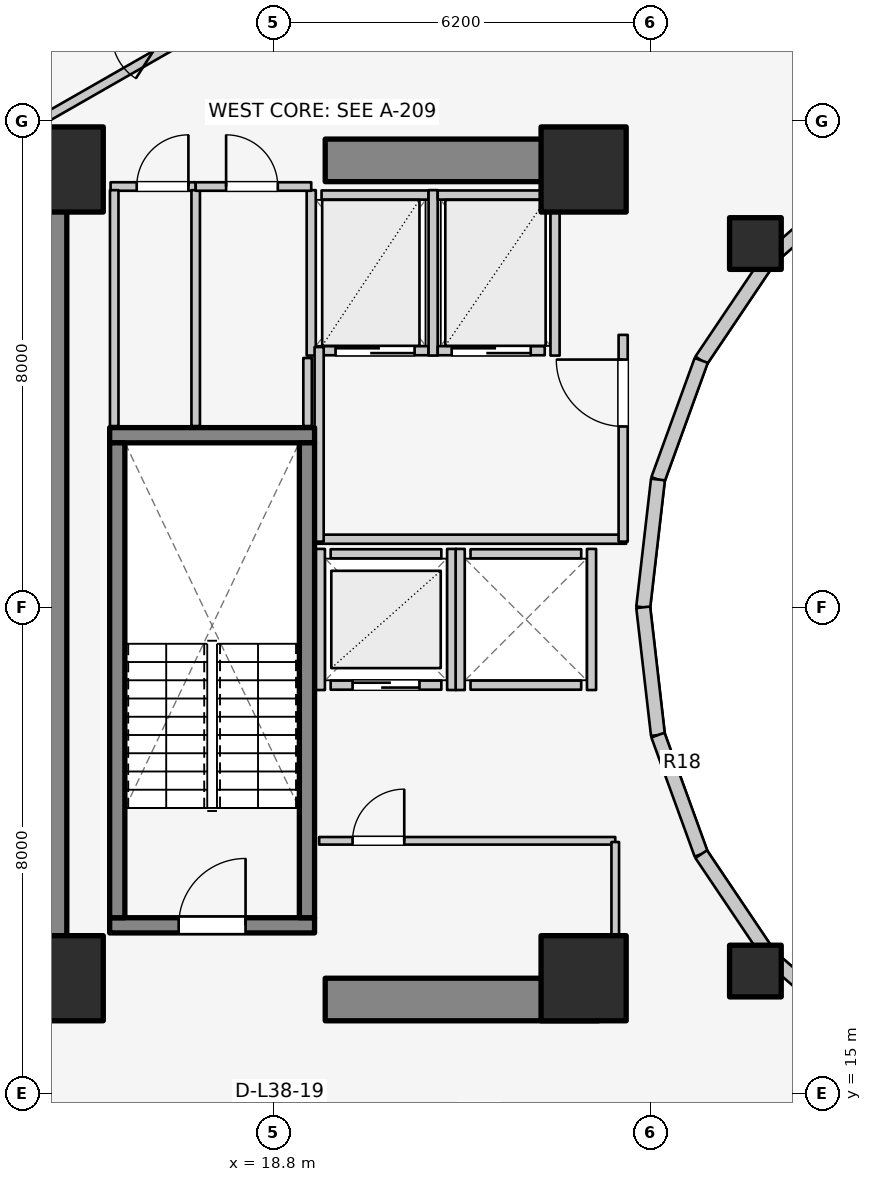
"""IFC4 building model, lengths in metres.
Left out: names, types, materials, properties, quantities, classifications, styles, units other than length and angle.
Written with IfcOpenShell. Run it as: python <this file> out.ifc"""

import sys

from ifc_helpers import new_model, si_unit, direction, frame, frame_2d, origin, origin_2d, place, context, subcontext, project, spatial, rectangle, extrude, element, fill, save


model = new_model("IFC4")
c1 = context("Model", 3, precision=1e-05, world=origin(), true_north=direction((0.0, 1.0)))
c2 = subcontext(c1, "Body", "Model", "MODEL_VIEW")
j1 = project(units=[si_unit("LENGTHUNIT", "METRE"), si_unit("PLANEANGLEUNIT", "RADIAN")], contexts=[c1])
p1 = place(None, origin())
s1 = spatial("IfcSite", under=j1, at=p1, CompositionType="ELEMENT")
p2 = place(p1, origin())
s2 = spatial("IfcBuilding", under=s1, at=p2, CompositionType="ELEMENT")
p3 = place(p2, frame((0.0, 0.0, 125.9)))
s3 = spatial("IfcBuildingStorey", under=s2, at=p3, CompositionType="ELEMENT", Elevation=125.9)
p4 = place(p3, frame((15.05, 17.05, 0.0), z_axis=(0.0, 0.0, 1.0), x_axis=(0.0, 1.0, 0.0)))
e1 = element("IfcWall", 1, at=p4, inside=s3, PredefinedType="SHEAR", context=c2, shape_type="SweptSolid", body=[
    extrude(rectangle(XDim=12.8, YDim=0.7, at=frame_2d((6.4, 0.0))), origin(), (0.0, 0.0, 1.0), 3.1),
])
for number, where, z_axis, x_axis in (
    (2, (19.65, 16.55, 0.0), (0.0, 0.0, 1.0), (1.0, 0.0, 0.0)),
    (3, (19.65, 30.35, 0.0), (0.0, 0.0, 1.0), (1.0, 0.0, 0.0)),
):
    element("IfcWall", number, at=place(p3, frame(where, z_axis=z_axis, x_axis=x_axis)), inside=s3, PredefinedType="SHEAR", context=c2, shape_type="SweptSolid", body=[
        extrude(rectangle(XDim=4.5, YDim=0.7, at=frame_2d((2.25, 0.0))), origin(), (0.0, 0.0, 1.0), 3.1),
    ])
p5 = place(p3, frame((16.105, 17.77, 0.0), z_axis=(0.0, 0.0, 1.0), x_axis=(1.0, 0.0, 0.0)))
e4 = element("IfcWall", 4, at=p5, inside=s3, PredefinedType="SOLIDWALL", context=c2, shape_type="SweptSolid", body=[
    extrude(rectangle(XDim=3.37, YDim=0.25, at=frame_2d((1.685, 0.0))), origin(), (0.0, 0.0, 1.0), 3.1),
])
p6 = place(p5, frame((1.135, 0.0, 0.0)))
e5 = element("IfcOpeningElement", 5, at=p6, cuts=e4, PredefinedType="OPENING", context=c2, shape_type="SweptSolid", body=[
    extrude(rectangle(XDim=1.1, YDim=2.1, at=frame_2d((0.55, 1.05))), frame((0.0, 0.135, 0.0), z_axis=(0.0, -1.0, 0.0), x_axis=(1.0, 0.0, 0.0)), (0.0, 0.0, 1.0), 0.27),
])
p7 = place(p3, frame((16.105, 25.83, 0.0), z_axis=(0.0, 0.0, 1.0), x_axis=(1.0, 0.0, 0.0)))
e6 = element("IfcWall", 6, at=p7, inside=s3, PredefinedType="SOLIDWALL", context=c2, shape_type="SweptSolid", body=[
    extrude(rectangle(XDim=3.37, YDim=0.25, at=frame_2d((1.685, 0.0))), origin(), (0.0, 0.0, 1.0), 3.1),
])
for number, where, z_axis, x_axis in (
    (7, (16.23, 17.895, 0.0), (0.0, 0.0, 1.0), (0.0, 1.0, 0.0)),
    (8, (19.35, 17.895, 0.0), (0.0, 0.0, 1.0), (0.0, 1.0, 0.0)),
):
    element("IfcWall", number, at=place(p3, frame(where, z_axis=z_axis, x_axis=x_axis)), inside=s3, PredefinedType="SOLIDWALL", context=c2, shape_type="SweptSolid", body=[
        extrude(rectangle(XDim=7.81, YDim=0.25, at=frame_2d((3.905, 0.0))), origin(), (0.0, 0.0, 1.0), 3.1),
    ])
for number, where, z_axis, x_axis in (
    (9, (15.3, 16.9, 0.0), (0.0, 0.0, 1.0), (1.0, 0.0, 0.0)),
    (10, (23.9, 16.9, 0.0), (0.0, 0.0, 1.0), (1.0, 0.0, 0.0)),
    (11, (23.9, 30.2, 0.0), (0.0, 0.0, 1.0), (1.0, 0.0, 0.0)),
    (12, (15.3, 30.2, 0.0), (0.0, 0.0, 1.0), (1.0, 0.0, 0.0)),
):
    element("IfcColumn", number, at=place(p3, frame(where, z_axis=z_axis, x_axis=x_axis)), inside=s3, PredefinedType="COLUMN", context=c2, shape_type="SweptSolid", body=[
        extrude(rectangle(XDim=1.4, YDim=1.4, at=origin_2d()), origin(), (0.0, 0.0, 1.0), 3.1),
    ])
for number, where, z_axis, x_axis in (
    (13, (26.725, 28.982, 0.0), (0.0, 0.0, 1.0), (1.0, 0.0, 0.0)),
    (14, (26.725, 17.018, 0.0), (0.0, 0.0, 1.0), (1.0, 0.0, 0.0)),
):
    element("IfcColumn", number, at=place(p3, frame(where, z_axis=z_axis, x_axis=x_axis)), inside=s3, PredefinedType="COLUMN", context=c2, shape_type="SweptSolid", body=[
        extrude(rectangle(XDim=0.85, YDim=0.85, at=origin_2d()), origin(), (0.0, 0.0, 1.0), 3.1),
    ])
p8 = place(p3, frame((28.44, 30.032, 0.0), z_axis=(0.0, 0.0, 1.0), x_axis=(-0.752576694707, -0.658504607869, 0.0)))
e15 = element("IfcWall", 15, at=p8, inside=s3, PredefinedType="STANDARD", context=c2, shape_type="SweptSolid", body=[
    extrude(rectangle(XDim=1.959, YDim=0.23, at=frame_2d((0.98, 0.0))), origin(), (0.0, 0.0, 1.0), 1.22),
])
p9 = place(p3, frame((26.965, 28.742, 0.0), z_axis=(0.0, 0.0, 1.0), x_axis=(-0.558197800898, -0.829707909492, 0.0)))
e16 = element("IfcWall", 16, at=p9, inside=s3, PredefinedType="STANDARD", context=c2, shape_type="SweptSolid", body=[
    extrude(rectangle(XDim=2.027, YDim=0.23, at=frame_2d((1.013, 0.0))), origin(), (0.0, 0.0, 1.0), 1.22),
])
p10 = place(p3, frame((25.834, 27.06, 0.0), z_axis=(0.0, 0.0, 1.0), x_axis=(-0.341423187295, -0.93990968033, 0.0)))
e17 = element("IfcWall", 17, at=p10, inside=s3, PredefinedType="STANDARD", context=c2, shape_type="SweptSolid", body=[
    extrude(rectangle(XDim=2.084, YDim=0.23, at=frame_2d((1.042, 0.0))), origin(), (0.0, 0.0, 1.0), 2.56),
])
for number, where, z_axis, x_axis in (
    (18, (25.123, 25.102, 0.0), (0.0, 0.0, 1.0), (-0.115, -0.993, 0.0)),
    (19, (24.88, 23.0, 0.0), (0.0, 0.0, 1.0), (0.115, -0.993, 0.0)),
):
    element("IfcWall", number, at=place(p3, frame(where, z_axis=z_axis, x_axis=x_axis)), inside=s3, PredefinedType="STANDARD", context=c2, shape_type="SweptSolid", body=[
        extrude(rectangle(XDim=2.115, YDim=0.23, at=frame_2d((1.058, 0.0))), origin(), (0.0, 0.0, 1.0), 2.56),
    ])
p11 = place(p3, frame((25.123, 20.898, 0.0), z_axis=(0.0, 0.0, 1.0), x_axis=(0.341423187295, -0.93990968033, 0.0)))
e20 = element("IfcWall", 20, at=p11, inside=s3, PredefinedType="STANDARD", context=c2, shape_type="SweptSolid", body=[
    extrude(rectangle(XDim=2.084, YDim=0.23, at=frame_2d((1.042, 0.0))), origin(), (0.0, 0.0, 1.0), 2.56),
])
p12 = place(p3, frame((25.834, 18.94, 0.0), z_axis=(0.0, 0.0, 1.0), x_axis=(0.558197800898, -0.829707909492, 0.0)))
e21 = element("IfcWall", 21, at=p12, inside=s3, PredefinedType="STANDARD", context=c2, shape_type="SweptSolid", body=[
    extrude(rectangle(XDim=2.027, YDim=0.23, at=frame_2d((1.013, 0.0))), origin(), (0.0, 0.0, 1.0), 1.22),
])
p13 = place(p3, frame((26.965, 17.258, 0.0), z_axis=(0.0, 0.0, 1.0), x_axis=(0.752576694707, -0.658504607869, 0.0)))
e22 = element("IfcWall", 22, at=p13, inside=s3, PredefinedType="STANDARD", context=c2, shape_type="SweptSolid", body=[
    extrude(rectangle(XDim=1.959, YDim=0.23, at=frame_2d((0.98, 0.0))), origin(), (0.0, 0.0, 1.0), 1.22),
])
p14 = place(p3, frame((19.74, 21.72, 0.0), z_axis=(0.0, 0.0, 1.0), x_axis=(1.0, 0.0, 0.0)))
e23 = element("IfcWall", 23, at=p14, inside=s3, PredefinedType="SOLIDWALL", context=c2, shape_type="SweptSolid", body=[
    extrude(rectangle(XDim=1.82, YDim=0.15, at=frame_2d((0.91, 0.0))), origin(), (0.0, 0.0, 1.0), 2.575),
])
p15 = place(p14, frame((0.36, 0.0, 0.0)))
e24 = element("IfcOpeningElement", 24, at=p15, cuts=e23, PredefinedType="OPENING", context=c2, shape_type="SweptSolid", body=[
    extrude(rectangle(XDim=1.1, YDim=2.1, at=frame_2d((0.55, 1.05))), frame((0.0, 0.085, 0.0), z_axis=(0.0, -1.0, 0.0), x_axis=(1.0, 0.0, 0.0)), (0.0, 0.0, 1.0), 0.17),
])
p16 = place(p3, frame((19.74, 23.88, 0.0), z_axis=(0.0, 0.0, 1.0), x_axis=(1.0, 0.0, 0.0)))
e25 = element("IfcWall", 25, at=p16, inside=s3, PredefinedType="SOLIDWALL", context=c2, shape_type="SweptSolid", body=[
    extrude(rectangle(XDim=1.82, YDim=0.15, at=frame_2d((0.91, 0.0))), origin(), (0.0, 0.0, 1.0), 2.575),
])
for number, where, z_axis, x_axis in (
    (26, (19.57, 21.64, 0.0), (0.0, 0.0, 1.0), (0.0, 1.0, 0.0)),
    (27, (21.73, 21.64, 0.0), (0.0, 0.0, 1.0), (0.0, 1.0, 0.0)),
):
    element("IfcWall", number, at=place(p3, frame(where, z_axis=z_axis, x_axis=x_axis)), inside=s3, PredefinedType="SOLIDWALL", context=c2, shape_type="SweptSolid", body=[
        extrude(rectangle(XDim=2.32, YDim=0.15, at=frame_2d((1.16, 0.0))), origin(), (0.0, 0.0, 1.0), 2.575),
    ])
for number, where, z_axis, x_axis in (
    (28, (22.04, 21.72, 0.0), (0.0, 0.0, 1.0), (1.0, 0.0, 0.0)),
    (29, (22.04, 23.88, 0.0), (0.0, 0.0, 1.0), (1.0, 0.0, 0.0)),
):
    element("IfcWall", number, at=place(p3, frame(where, z_axis=z_axis, x_axis=x_axis)), inside=s3, PredefinedType="SOLIDWALL", context=c2, shape_type="SweptSolid", body=[
        extrude(rectangle(XDim=1.82, YDim=0.15, at=frame_2d((0.91, 0.0))), origin(), (0.0, 0.0, 1.0), 2.12),
    ])
p17 = place(p3, frame((21.87, 21.64, 0.0), z_axis=(0.0, 0.0, 1.0), x_axis=(0.0, 1.0, 0.0)))
e30 = element("IfcWall", 30, at=p17, inside=s3, PredefinedType="SOLIDWALL", context=c2, shape_type="SweptSolid", body=[
    extrude(rectangle(XDim=2.32, YDim=0.15, at=frame_2d((1.16, 0.0))), origin(), (0.0, 0.0, 1.0), 2.575),
])
p18 = place(p3, frame((24.03, 21.64, 0.0), z_axis=(0.0, 0.0, 1.0), x_axis=(0.0, 1.0, 0.0)))
e31 = element("IfcWall", 31, at=p18, inside=s3, PredefinedType="SOLIDWALL", context=c2, shape_type="SweptSolid", body=[
    extrude(rectangle(XDim=2.32, YDim=0.15, at=frame_2d((1.16, 0.0))), origin(), (0.0, 0.0, 1.0), 2.12),
])
p19 = place(p3, frame((19.59, 27.22, 0.0), z_axis=(0.0, 0.0, 1.0), x_axis=(1.0, 0.0, 0.0)))
e32 = element("IfcWall", 32, at=p19, inside=s3, PredefinedType="SOLIDWALL", context=c2, shape_type="SweptSolid", body=[
    extrude(rectangle(XDim=1.76, YDim=0.15, at=frame_2d((0.88, 0.0))), origin(), (0.0, 0.0, 1.0), 2.575),
])
p20 = place(p19, frame((0.23, 0.0, 0.0)))
e33 = element("IfcOpeningElement", 33, at=p20, cuts=e32, PredefinedType="OPENING", context=c2, shape_type="SweptSolid", body=[
    extrude(rectangle(XDim=1.3, YDim=2.1, at=frame_2d((0.65, 1.05))), frame((0.0, 0.085, 0.0), z_axis=(0.0, -1.0, 0.0), x_axis=(1.0, 0.0, 0.0)), (0.0, 0.0, 1.0), 0.17),
])
p21 = place(p3, frame((19.59, 29.78, 0.0), z_axis=(0.0, 0.0, 1.0), x_axis=(1.0, 0.0, 0.0)))
e34 = element("IfcWall", 34, at=p21, inside=s3, PredefinedType="SOLIDWALL", context=c2, shape_type="SweptSolid", body=[
    extrude(rectangle(XDim=1.76, YDim=0.15, at=frame_2d((0.88, 0.0))), origin(), (0.0, 0.0, 1.0), 2.575),
])
for number, where, z_axis, x_axis in (
    (35, (19.42, 27.14, 0.0), (0.0, 0.0, 1.0), (0.0, 1.0, 0.0)),
    (36, (21.425, 27.14, 0.0), (0.0, 0.0, 1.0), (0.0, 1.0, 0.0)),
):
    element("IfcWall", number, at=place(p3, frame(where, z_axis=z_axis, x_axis=x_axis)), inside=s3, PredefinedType="SOLIDWALL", context=c2, shape_type="SweptSolid", body=[
        extrude(rectangle(XDim=2.72, YDim=0.15, at=frame_2d((1.36, 0.0))), origin(), (0.0, 0.0, 1.0), 2.575),
    ])
p22 = place(p3, frame((21.5, 27.22, 0.0), z_axis=(0.0, 0.0, 1.0), x_axis=(1.0, 0.0, 0.0)))
e37 = element("IfcWall", 37, at=p22, inside=s3, PredefinedType="SOLIDWALL", context=c2, shape_type="SweptSolid", body=[
    extrude(rectangle(XDim=1.76, YDim=0.15, at=frame_2d((0.88, 0.0))), origin(), (0.0, 0.0, 1.0), 2.575),
])
p23 = place(p22, frame((0.23, 0.0, 0.0)))
e38 = element("IfcOpeningElement", 38, at=p23, cuts=e37, PredefinedType="OPENING", context=c2, shape_type="SweptSolid", body=[
    extrude(rectangle(XDim=1.3, YDim=2.1, at=frame_2d((0.65, 1.05))), frame((0.0, 0.085, 0.0), z_axis=(0.0, -1.0, 0.0), x_axis=(1.0, 0.0, 0.0)), (0.0, 0.0, 1.0), 0.17),
])
p24 = place(p3, frame((21.5, 29.78, 0.0), z_axis=(0.0, 0.0, 1.0), x_axis=(1.0, 0.0, 0.0)))
e39 = element("IfcWall", 39, at=p24, inside=s3, PredefinedType="SOLIDWALL", context=c2, shape_type="SweptSolid", body=[
    extrude(rectangle(XDim=1.76, YDim=0.15, at=frame_2d((0.88, 0.0))), origin(), (0.0, 0.0, 1.0), 2.575),
])
p25 = place(p3, frame((23.43, 27.14, 0.0), z_axis=(0.0, 0.0, 1.0), x_axis=(0.0, 1.0, 0.0)))
e40 = element("IfcWall", 40, at=p25, inside=s3, PredefinedType="SOLIDWALL", context=c2, shape_type="SweptSolid", body=[
    extrude(rectangle(XDim=2.72, YDim=0.15, at=frame_2d((1.36, 0.0))), origin(), (0.0, 0.0, 1.0), 2.575),
])
p26 = place(p3, frame((19.52, 24.12, 0.0), z_axis=(0.0, 0.0, 1.0), x_axis=(1.0, 0.0, 0.0)))
e41 = element("IfcWall", 41, at=p26, inside=s3, PredefinedType="PARTITIONING", context=c2, shape_type="SweptSolid", body=[
    extrude(rectangle(XDim=5.08, YDim=0.15, at=frame_2d((2.54, 0.0))), origin(), (0.0, 0.0, 1.0), 2.12),
])
p27 = place(p3, frame((19.55, 24.08, 0.0), z_axis=(0.0, 0.0, 1.0), x_axis=(0.0, 1.0, 0.0)))
e42 = element("IfcWall", 42, at=p27, inside=s3, PredefinedType="PARTITIONING", context=c2, shape_type="SweptSolid", body=[
    extrude(rectangle(XDim=3.2, YDim=0.15, at=frame_2d((1.6, 0.0))), origin(), (0.0, 0.0, 1.0), 2.575),
])
p28 = place(p3, frame((24.55, 24.08, 0.0), z_axis=(0.0, 0.0, 1.0), x_axis=(0.0, 1.0, 0.0)))
e43 = element("IfcWall", 43, at=p28, inside=s3, PredefinedType="PARTITIONING", context=c2, shape_type="SweptSolid", body=[
    extrude(rectangle(XDim=3.4, YDim=0.15, at=frame_2d((1.7, 0.0))), origin(), (0.0, 0.0, 1.0), 2.575),
])
p29 = place(p28, frame((1.894, 0.0, 0.0)))
e44 = element("IfcOpeningElement", 44, at=p29, cuts=e43, PredefinedType="OPENING", context=c2, shape_type="SweptSolid", body=[
    extrude(rectangle(XDim=1.1, YDim=2.1, at=frame_2d((0.55, 1.05))), frame((0.0, 0.085, 0.0), z_axis=(0.0, -1.0, 0.0), x_axis=(1.0, 0.0, 0.0)), (0.0, 0.0, 1.0), 0.17),
])
p30 = place(p3, frame((19.55, 19.16, 0.0), z_axis=(0.0, 0.0, 1.0), x_axis=(1.0, 0.0, 0.0)))
e45 = element("IfcWall", 45, at=p30, inside=s3, PredefinedType="PARTITIONING", context=c2, shape_type="SweptSolid", body=[
    extrude(rectangle(XDim=4.87, YDim=0.125, at=frame_2d((2.435, 0.0))), origin(), (0.0, 0.0, 1.0), 2.12),
])
p31 = place(p30, frame((0.55, 0.0, 0.0)))
e46 = element("IfcOpeningElement", 46, at=p31, cuts=e45, PredefinedType="OPENING", context=c2, shape_type="SweptSolid", body=[
    extrude(rectangle(XDim=0.85, YDim=2.05, at=frame_2d((0.425, 1.025))), frame((0.0, 0.073, 0.0), z_axis=(0.0, -1.0, 0.0), x_axis=(1.0, 0.0, 0.0)), (0.0, 0.0, 1.0), 0.145),
])
p32 = place(p3, frame((24.42, 17.1, 0.0), z_axis=(0.0, 0.0, 1.0), x_axis=(0.0, 1.0, 0.0)))
e47 = element("IfcWall", 47, at=p32, inside=s3, PredefinedType="PARTITIONING", context=c2, shape_type="SweptSolid", body=[
    extrude(rectangle(XDim=2.04, YDim=0.125, at=frame_2d((1.02, 0.0))), origin(), (0.0, 0.0, 1.0), 1.873),
])
p33 = place(p3, frame((16.12, 29.92, 0.0), z_axis=(0.0, 0.0, 1.0), x_axis=(1.0, 0.0, 0.0)))
e48 = element("IfcWall", 48, at=p33, inside=s3, PredefinedType="PLUMBINGWALL", context=c2, shape_type="SweptSolid", body=[
    extrude(rectangle(XDim=1.4, YDim=0.14, at=frame_2d((0.7, 0.0))), origin(), (0.0, 0.0, 1.0), 2.575),
])
p34 = place(p33, frame((0.43, 0.0, 0.0)))
e49 = element("IfcOpeningElement", 49, at=p34, cuts=e48, PredefinedType="OPENING", context=c2, shape_type="SweptSolid", body=[
    extrude(rectangle(XDim=0.85, YDim=2.05, at=frame_2d((0.425, 1.025))), frame((0.0, 0.08, 0.0), z_axis=(0.0, -1.0, 0.0), x_axis=(1.0, 0.0, 0.0)), (0.0, 0.0, 1.0), 0.16),
])
for number, where, z_axis, x_axis in (
    (50, (16.18, 25.98, 0.0), (0.0, 0.0, 1.0), (0.0, 1.0, 0.0)),
    (51, (17.52, 25.98, 0.0), (0.0, 0.0, 1.0), (0.0, 1.0, 0.0)),
):
    element("IfcWall", number, at=place(p3, frame(where, z_axis=z_axis, x_axis=x_axis)), inside=s3, PredefinedType="PLUMBINGWALL", context=c2, shape_type="SweptSolid", body=[
        extrude(rectangle(XDim=3.88, YDim=0.14, at=frame_2d((1.94, 0.0))), origin(), (0.0, 0.0, 1.0), 2.575),
    ])
p35 = place(p3, frame((17.52, 29.92, 0.0), z_axis=(0.0, 0.0, 1.0), x_axis=(1.0, 0.0, 0.0)))
e52 = element("IfcWall", 52, at=p35, inside=s3, PredefinedType="PLUMBINGWALL", context=c2, shape_type="SweptSolid", body=[
    extrude(rectangle(XDim=1.9, YDim=0.14, at=frame_2d((0.95, 0.0))), origin(), (0.0, 0.0, 1.0), 2.575),
])
p36 = place(p35, frame((0.5, 0.0, 0.0)))
e53 = element("IfcOpeningElement", 53, at=p36, cuts=e52, PredefinedType="OPENING", context=c2, shape_type="SweptSolid", body=[
    extrude(rectangle(XDim=0.85, YDim=2.05, at=frame_2d((0.425, 1.025))), frame((0.0, 0.08, 0.0), z_axis=(0.0, -1.0, 0.0), x_axis=(1.0, 0.0, 0.0)), (0.0, 0.0, 1.0), 0.16),
])
p37 = place(p3, frame((19.36, 25.98, 0.0), z_axis=(0.0, 0.0, 1.0), x_axis=(0.0, 1.0, 0.0)))
e54 = element("IfcWall", 54, at=p37, inside=s3, PredefinedType="PLUMBINGWALL", context=c2, shape_type="SweptSolid", body=[
    extrude(rectangle(XDim=1.12, YDim=0.14, at=frame_2d((0.56, 0.0))), origin(), (0.0, 0.0, 1.0), 2.575),
])
p38 = place(p3, frame((17.243, 32.305, 0.0), z_axis=(0.0, 0.0, 1.0), x_axis=(-0.867991349648, -0.496579315857, 0.0)))
e55 = element("IfcWall", 55, at=p38, inside=s3, PredefinedType="PARTITIONING", context=c2, shape_type="SweptSolid", body=[
    extrude(rectangle(XDim=2.567, YDim=0.15, at=frame_2d((1.283, 0.0))), origin(), (0.0, 0.0, 1.0), 1.22),
])
p39 = place(p3, frame((28.45, 15.985, 0.0), z_axis=(0.0, 0.0, 1.0), x_axis=(-0.523587550846, -0.851971875474, 0.0)))
e56 = element("IfcWall", 56, at=p39, inside=s3, PredefinedType="PARTITIONING", context=c2, shape_type="SweptSolid", body=[
    extrude(rectangle(XDim=3.153, YDim=0.125, at=frame_2d((1.577, 0.0))), origin(), (0.0, 0.0, 1.0), 1.22),
])
p40 = place(p6, origin())
e57 = element("IfcDoor", 57, at=p40, inside=s3, OperationType="SINGLE_SWING_RIGHT", PredefinedType="DOOR", context=c2, shape_type="SweptSolid", body=[
    extrude(rectangle(XDim=1.1, YDim=2.1, at=frame_2d((0.55, 1.05))), frame((0.0, 0.025, 0.0), z_axis=(0.0, -1.0, 0.0), x_axis=(1.0, 0.0, 0.0)), (0.0, 0.0, 1.0), 0.05),
])
fill(e5, e57)
p41 = place(p15, origin())
e58 = element("IfcDoor", 58, at=p41, inside=s3, OperationType="DOUBLE_DOOR_SLIDING", PredefinedType="DOOR", context=c2, shape_type="SweptSolid", body=[
    extrude(rectangle(XDim=1.1, YDim=2.1, at=frame_2d((0.55, 1.05))), frame((0.0, 0.025, 0.0), z_axis=(0.0, -1.0, 0.0), x_axis=(1.0, 0.0, 0.0)), (0.0, 0.0, 1.0), 0.05),
])
fill(e24, e58)
p42 = place(p20, origin())
e59 = element("IfcDoor", 59, at=p42, inside=s3, OperationType="DOUBLE_DOOR_SLIDING", PredefinedType="DOOR", context=c2, shape_type="SweptSolid", body=[
    extrude(rectangle(XDim=1.3, YDim=2.1, at=frame_2d((0.65, 1.05))), frame((0.0, 0.025, 0.0), z_axis=(0.0, -1.0, 0.0), x_axis=(1.0, 0.0, 0.0)), (0.0, 0.0, 1.0), 0.05),
])
fill(e33, e59)
p43 = place(p23, origin())
e60 = element("IfcDoor", 60, at=p43, inside=s3, OperationType="DOUBLE_DOOR_SLIDING", PredefinedType="DOOR", context=c2, shape_type="SweptSolid", body=[
    extrude(rectangle(XDim=1.3, YDim=2.1, at=frame_2d((0.65, 1.05))), frame((0.0, 0.025, 0.0), z_axis=(0.0, -1.0, 0.0), x_axis=(1.0, 0.0, 0.0)), (0.0, 0.0, 1.0), 0.05),
])
fill(e38, e60)
p44 = place(p29, origin())
e61 = element("IfcDoor", 61, at=p44, inside=s3, OperationType="SINGLE_SWING_RIGHT", PredefinedType="DOOR", context=c2, shape_type="SweptSolid", body=[
    extrude(rectangle(XDim=1.1, YDim=2.1, at=frame_2d((0.55, 1.05))), frame((0.0, 0.025, 0.0), z_axis=(0.0, -1.0, 0.0), x_axis=(1.0, 0.0, 0.0)), (0.0, 0.0, 1.0), 0.05),
])
fill(e44, e61)
p45 = place(p31, origin())
e62 = element("IfcDoor", 62, at=p45, inside=s3, OperationType="SINGLE_SWING_RIGHT", PredefinedType="DOOR", context=c2, shape_type="SweptSolid", body=[
    extrude(rectangle(XDim=0.85, YDim=2.05, at=frame_2d((0.425, 1.025))), frame((0.0, 0.025, 0.0), z_axis=(0.0, -1.0, 0.0), x_axis=(1.0, 0.0, 0.0)), (0.0, 0.0, 1.0), 0.05),
])
fill(e46, e62)
p46 = place(p34, origin())
e63 = element("IfcDoor", 63, at=p46, inside=s3, OperationType="SINGLE_SWING_RIGHT", PredefinedType="DOOR", context=c2, shape_type="SweptSolid", body=[
    extrude(rectangle(XDim=0.85, YDim=2.05, at=frame_2d((0.425, 1.025))), frame((0.0, 0.025, 0.0), z_axis=(0.0, -1.0, 0.0), x_axis=(1.0, 0.0, 0.0)), (0.0, 0.0, 1.0), 0.05),
])
fill(e49, e63)
p47 = place(p36, origin())
e64 = element("IfcDoor", 64, at=p47, inside=s3, OperationType="SINGLE_SWING_LEFT", PredefinedType="DOOR", context=c2, shape_type="SweptSolid", body=[
    extrude(rectangle(XDim=0.85, YDim=2.05, at=frame_2d((0.425, 1.025))), frame((0.0, 0.025, 0.0), z_axis=(0.0, -1.0, 0.0), x_axis=(1.0, 0.0, 0.0)), (0.0, 0.0, 1.0), 0.05),
])
fill(e53, e64)
save(model, sys.argv[1])
